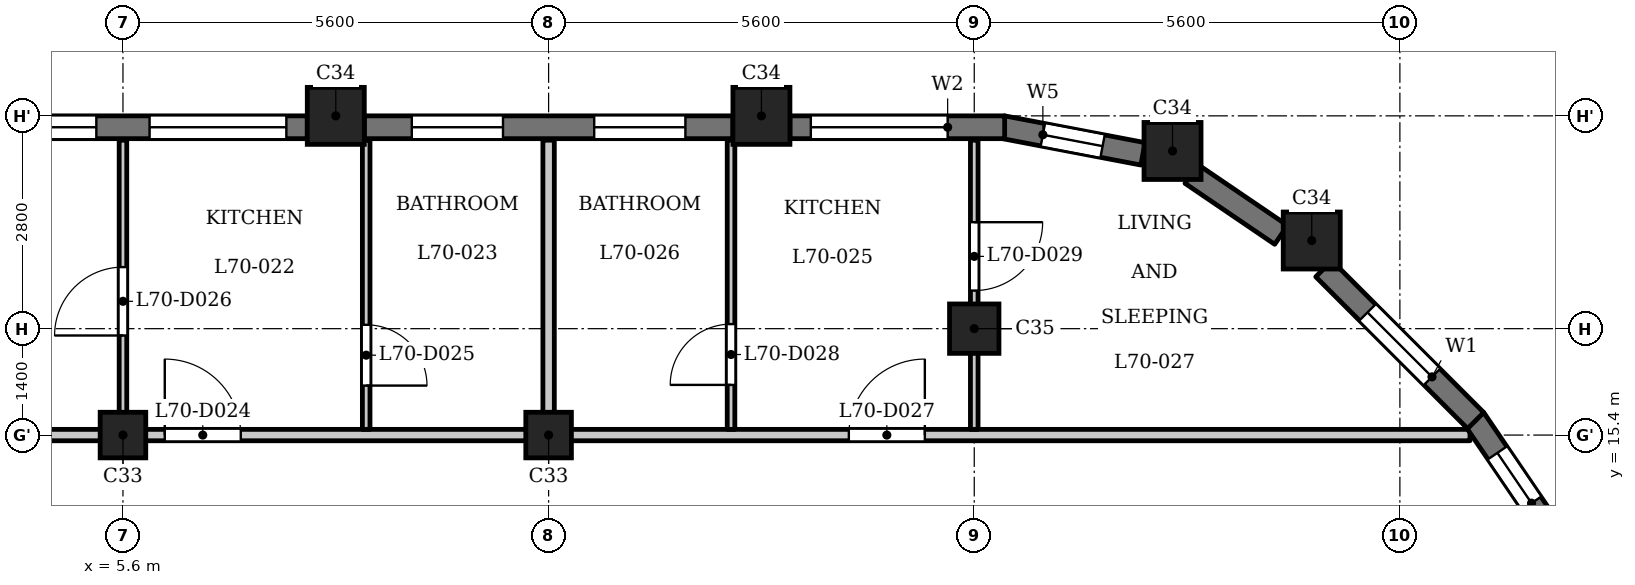
"""IFC4 building model, lengths in metres.
Left out: names, types, materials, properties, quantities, classifications, styles, units other than length and angle.
Written with IfcOpenShell. Run it as: python <this file> out.ifc"""

import sys

from ifc_helpers import new_model, si_unit, direction, frame, frame_2d, origin, origin_2d, place, context, subcontext, project, spatial, rectangle, extrude, element, fill, save


model = new_model("IFC4")
c1 = context("Model", 3, precision=1e-05, world=origin(), true_north=direction((0.0, 1.0)))
c2 = subcontext(c1, "Body", "Model", "MODEL_VIEW")
j1 = project(units=[si_unit("LENGTHUNIT", "METRE"), si_unit("PLANEANGLEUNIT", "RADIAN")], contexts=[c1])
p1 = place(None, origin())
s1 = spatial("IfcSite", under=j1, at=p1, CompositionType="ELEMENT")
p2 = place(p1, origin())
s2 = spatial("IfcBuilding", under=s1, at=p2, CompositionType="ELEMENT")
p3 = place(p2, frame((0.0, 0.0, 269.7)))
s3 = spatial("IfcBuildingStorey", under=s2, at=p3, CompositionType="ELEMENT", Elevation=269.7)
for number, where, z_axis, x_axis in (
    (1, (21.24, 17.96, 0.0), (0.0, 0.0, 1.0), (1.0, 0.0, 0.0)),
    (2, (19.409, 19.138, 0.0), (0.0, 0.0, 1.0), (1.0, 0.0, 0.0)),
    (3, (14.0, 19.6, 0.0), (0.0, 0.0, 1.0), (1.0, 0.0, 0.0)),
    (4, (8.4, 19.6, 0.0), (0.0, 0.0, 1.0), (1.0, 0.0, 0.0)),
):
    element("IfcColumn", number, at=place(p3, frame(where, z_axis=z_axis, x_axis=x_axis)), inside=s3, PredefinedType="COLUMN", context=c2, shape_type="SweptSolid", body=[
        extrude(rectangle(XDim=0.75, YDim=0.75, at=origin_2d()), origin(), (0.0, 0.0, 1.0), 3.5),
    ])
p4 = place(p3, frame((16.8, 16.8, 0.0), z_axis=(0.0, 0.0, 1.0), x_axis=(1.0, 0.0, 0.0)))
e5 = element("IfcColumn", 5, at=p4, inside=s3, PredefinedType="COLUMN", context=c2, shape_type="SweptSolid", body=[
    extrude(rectangle(XDim=0.65, YDim=0.65, at=origin_2d()), origin(), (0.0, 0.0, 1.0), 3.5),
])
for number, where, z_axis, x_axis in (
    (6, (5.6, 15.4, 0.0), (0.0, 0.0, 1.0), (1.0, 0.0, 0.0)),
    (7, (11.2, 15.4, 0.0), (0.0, 0.0, 1.0), (1.0, 0.0, 0.0)),
):
    element("IfcColumn", number, at=place(p3, frame(where, z_axis=z_axis, x_axis=x_axis)), inside=s3, PredefinedType="COLUMN", context=c2, shape_type="SweptSolid", body=[
        extrude(rectangle(XDim=0.6, YDim=0.6, at=origin_2d()), origin(), (0.0, 0.0, 1.0), 3.5),
    ])
p5 = place(p3, frame((24.436, 14.057, 0.0), z_axis=(0.0, 0.0, 1.0), x_axis=(-0.562075713892, 0.827085782645, 0.0)))
e8 = element("IfcWall", 8, at=p5, inside=s3, PredefinedType="SOLIDWALL", context=c2, shape_type="SweptSolid", body=[
    extrude(rectangle(XDim=1.881, YDim=0.3, at=frame_2d((0.94, 0.0))), origin(), (0.0, 0.0, 1.0), 2.55),
])
p6 = place(p5, frame((0.541, 0.0, 0.6)))
e9 = element("IfcOpeningElement", 9, at=p6, cuts=e8, PredefinedType="OPENING", context=c2, shape_type="SweptSolid", body=[
    extrude(rectangle(XDim=0.8, YDim=1.55, at=frame_2d((0.4, 0.775))), frame((0.0, 0.16, 0.0), z_axis=(0.0, -1.0, 0.0), x_axis=(1.0, 0.0, 0.0)), (0.0, 0.0, 1.0), 0.32),
])
p7 = place(p3, frame((23.397, 15.591, 0.0), z_axis=(0.0, 0.0, 1.0), x_axis=(-0.707106781187, 0.707106781187, 0.0)))
e10 = element("IfcWall", 10, at=p7, inside=s3, PredefinedType="SOLIDWALL", context=c2, shape_type="SweptSolid", body=[
    extrude(rectangle(XDim=2.825, YDim=0.3, at=frame_2d((1.413, 0.0))), origin(), (0.0, 0.0, 1.0), 2.55),
])
p8 = place(p7, frame((0.812, 0.0, 0.6)))
e11 = element("IfcOpeningElement", 11, at=p8, cuts=e10, PredefinedType="OPENING", context=c2, shape_type="SweptSolid", body=[
    extrude(rectangle(XDim=1.2, YDim=1.55, at=frame_2d((0.6, 0.775))), frame((0.0, 0.16, 0.0), z_axis=(0.0, -1.0, 0.0), x_axis=(1.0, 0.0, 0.0)), (0.0, 0.0, 1.0), 0.32),
])
p9 = place(p3, frame((20.837, 18.034, 0.0), z_axis=(0.0, 0.0, 1.0), x_axis=(-0.827095130818, 0.562061957952, 0.0)))
e12 = element("IfcWall", 12, at=p9, inside=s3, PredefinedType="SOLIDWALL", context=c2, shape_type="SweptSolid", body=[
    extrude(rectangle(XDim=1.427, YDim=0.3, at=frame_2d((0.713, 0.0))), origin(), (0.0, 0.0, 1.0), 2.55),
])
p10 = place(p3, frame((19.02, 19.1, 0.0), z_axis=(0.0, 0.0, 1.0), x_axis=(-0.982284001233, 0.187398348234, 0.0)))
e13 = element("IfcWall", 13, at=p10, inside=s3, PredefinedType="SOLIDWALL", context=c2, shape_type="SweptSolid", body=[
    extrude(rectangle(XDim=1.881, YDim=0.3, at=frame_2d((0.941, 0.0))), origin(), (0.0, 0.0, 1.0), 2.55),
])
p11 = place(p10, frame((0.541, 0.0, 0.6)))
e14 = element("IfcOpeningElement", 14, at=p11, cuts=e13, PredefinedType="OPENING", context=c2, shape_type="SweptSolid", body=[
    extrude(rectangle(XDim=0.8, YDim=1.55, at=frame_2d((0.4, 0.775))), frame((0.0, 0.16, 0.0), z_axis=(0.0, -1.0, 0.0), x_axis=(1.0, 0.0, 0.0)), (0.0, 0.0, 1.0), 0.32),
])
p12 = place(p3, frame((17.2, 19.45, 0.0), z_axis=(0.0, 0.0, 1.0), x_axis=(-1.0, 0.0, 0.0)))
e15 = element("IfcWall", 15, at=p12, inside=s3, PredefinedType="SOLIDWALL", context=c2, shape_type="SweptSolid", body=[
    extrude(rectangle(XDim=2.825, YDim=0.3, at=frame_2d((1.413, 0.0))), origin(), (0.0, 0.0, 1.0), 2.55),
])
p13 = place(p12, frame((0.75, 0.0, 0.9)))
e16 = element("IfcOpeningElement", 16, at=p13, cuts=e15, PredefinedType="OPENING", context=c2, shape_type="SweptSolid", body=[
    extrude(rectangle(XDim=1.8, YDim=1.25, at=frame_2d((0.9, 0.625))), frame((0.0, 0.16, 0.0), z_axis=(0.0, -1.0, 0.0), x_axis=(1.0, 0.0, 0.0)), (0.0, 0.0, 1.0), 0.32),
])
p14 = place(p3, frame((13.625, 19.45, 0.0), z_axis=(0.0, 0.0, 1.0), x_axis=(-1.0, 0.0, 0.0)))
e17 = element("IfcWall", 17, at=p14, inside=s3, PredefinedType="SOLIDWALL", context=c2, shape_type="SweptSolid", body=[
    extrude(rectangle(XDim=4.85, YDim=0.3, at=frame_2d((2.425, 0.0))), origin(), (0.0, 0.0, 1.0), 2.55),
])
p15 = place(p14, frame((0.625, 0.0, 0.6)))
e18 = element("IfcOpeningElement", 18, at=p15, cuts=e17, PredefinedType="OPENING", context=c2, shape_type="SweptSolid", body=[
    extrude(rectangle(XDim=1.2, YDim=1.55, at=frame_2d((0.6, 0.775))), frame((0.0, 0.16, 0.0), z_axis=(0.0, -1.0, 0.0), x_axis=(1.0, 0.0, 0.0)), (0.0, 0.0, 1.0), 0.32),
])
p16 = place(p14, frame((3.025, 0.0, 0.6)))
e19 = element("IfcOpeningElement", 19, at=p16, cuts=e17, PredefinedType="OPENING", context=c2, shape_type="SweptSolid", body=[
    extrude(rectangle(XDim=1.2, YDim=1.55, at=frame_2d((0.6, 0.775))), frame((0.0, 0.16, 0.0), z_axis=(0.0, -1.0, 0.0), x_axis=(1.0, 0.0, 0.0)), (0.0, 0.0, 1.0), 0.32),
])
p17 = place(p3, frame((8.025, 19.45, 0.0), z_axis=(0.0, 0.0, 1.0), x_axis=(-1.0, 0.0, 0.0)))
e20 = element("IfcWall", 20, at=p17, inside=s3, PredefinedType="SOLIDWALL", context=c2, shape_type="SweptSolid", body=[
    extrude(rectangle(XDim=4.85, YDim=0.3, at=frame_2d((2.425, 0.0))), origin(), (0.0, 0.0, 1.0), 2.55),
])
p18 = place(p17, frame((0.275, 0.0, 0.9)))
e21 = element("IfcOpeningElement", 21, at=p18, cuts=e20, PredefinedType="OPENING", context=c2, shape_type="SweptSolid", body=[
    extrude(rectangle(XDim=1.8, YDim=1.25, at=frame_2d((0.9, 0.625))), frame((0.0, 0.16, 0.0), z_axis=(0.0, -1.0, 0.0), x_axis=(1.0, 0.0, 0.0)), (0.0, 0.0, 1.0), 0.32),
])
p19 = place(p17, frame((2.775, 0.0, 0.9)))
e22 = element("IfcOpeningElement", 22, at=p19, cuts=e20, PredefinedType="OPENING", context=c2, shape_type="SweptSolid", body=[
    extrude(rectangle(XDim=1.8, YDim=1.25, at=frame_2d((0.9, 0.625))), frame((0.0, 0.16, 0.0), z_axis=(0.0, -1.0, 0.0), x_axis=(1.0, 0.0, 0.0)), (0.0, 0.0, 1.0), 0.32),
])
p20 = place(p3, frame((-23.55, 15.4, 0.0), z_axis=(0.0, 0.0, 1.0), x_axis=(1.0, 0.0, 0.0)))
e23 = element("IfcWall", 23, at=p20, inside=s3, PredefinedType="PARTITIONING", context=c2, shape_type="SweptSolid", body=[
    extrude(rectangle(XDim=46.872, YDim=0.15, at=frame_2d((23.436, 0.0))), origin(), (0.0, 0.0, 1.0), 3.2),
])
p21 = place(p20, frame((7.3, 0.0, 0.0)))
e24 = element("IfcOpeningElement", 24, at=p21, cuts=e23, PredefinedType="OPENING", context=c2, shape_type="SweptSolid", body=[
    extrude(rectangle(XDim=1.0, YDim=2.1, at=frame_2d((0.5, 1.05))), frame((0.0, 0.085, 0.0), z_axis=(0.0, -1.0, 0.0), x_axis=(1.0, 0.0, 0.0)), (0.0, 0.0, 1.0), 0.17),
])
p22 = place(p20, frame((16.3, 0.0, 0.0)))
e25 = element("IfcOpeningElement", 25, at=p22, cuts=e23, PredefinedType="OPENING", context=c2, shape_type="SweptSolid", body=[
    extrude(rectangle(XDim=1.0, YDim=2.1, at=frame_2d((0.5, 1.05))), frame((0.0, 0.085, 0.0), z_axis=(0.0, -1.0, 0.0), x_axis=(1.0, 0.0, 0.0)), (0.0, 0.0, 1.0), 0.17),
])
p23 = place(p20, frame((29.7, 0.0, 0.0)))
e26 = element("IfcOpeningElement", 26, at=p23, cuts=e23, PredefinedType="OPENING", context=c2, shape_type="SweptSolid", body=[
    extrude(rectangle(XDim=1.0, YDim=2.1, at=frame_2d((0.5, 1.05))), frame((0.0, 0.085, 0.0), z_axis=(0.0, -1.0, 0.0), x_axis=(1.0, 0.0, 0.0)), (0.0, 0.0, 1.0), 0.17),
])
p24 = place(p20, frame((38.7, 0.0, 0.0)))
e27 = element("IfcOpeningElement", 27, at=p24, cuts=e23, PredefinedType="OPENING", context=c2, shape_type="SweptSolid", body=[
    extrude(rectangle(XDim=1.0, YDim=2.1, at=frame_2d((0.5, 1.05))), frame((0.0, 0.085, 0.0), z_axis=(0.0, -1.0, 0.0), x_axis=(1.0, 0.0, 0.0)), (0.0, 0.0, 1.0), 0.17),
])
p25 = place(p3, frame((5.6, 15.475, 0.0), z_axis=(0.0, 0.0, 1.0), x_axis=(0.0, 1.0, 0.0)))
e28 = element("IfcWall", 28, at=p25, inside=s3, PredefinedType="PARTITIONING", context=c2, shape_type="SweptSolid", body=[
    extrude(rectangle(XDim=3.805, YDim=0.1, at=frame_2d((1.902, 0.0))), origin(), (0.0, 0.0, 1.0), 3.2),
])
p26 = place(p25, frame((1.235, 0.0, 0.0)))
e29 = element("IfcOpeningElement", 29, at=p26, cuts=e28, PredefinedType="OPENING", context=c2, shape_type="SweptSolid", body=[
    extrude(rectangle(XDim=0.9, YDim=2.1, at=frame_2d((0.45, 1.05))), frame((0.0, 0.06, 0.0), z_axis=(0.0, -1.0, 0.0), x_axis=(1.0, 0.0, 0.0)), (0.0, 0.0, 1.0), 0.12),
])
p27 = place(p3, frame((8.8, 15.475, 0.0), z_axis=(0.0, 0.0, 1.0), x_axis=(0.0, 1.0, 0.0)))
e30 = element("IfcWall", 30, at=p27, inside=s3, PredefinedType="PARTITIONING", context=c2, shape_type="SweptSolid", body=[
    extrude(rectangle(XDim=3.805, YDim=0.1, at=frame_2d((1.902, 0.0))), origin(), (0.0, 0.0, 1.0), 3.2),
])
p28 = place(p27, frame((0.576, 0.0, 0.0)))
e31 = element("IfcOpeningElement", 31, at=p28, cuts=e30, PredefinedType="OPENING", context=c2, shape_type="SweptSolid", body=[
    extrude(rectangle(XDim=0.8, YDim=2.1, at=frame_2d((0.4, 1.05))), frame((0.0, 0.06, 0.0), z_axis=(0.0, -1.0, 0.0), x_axis=(1.0, 0.0, 0.0)), (0.0, 0.0, 1.0), 0.12),
])
p29 = place(p3, frame((11.2, 15.475, 0.0), z_axis=(0.0, 0.0, 1.0), x_axis=(0.0, 1.0, 0.0)))
e32 = element("IfcWall", 32, at=p29, inside=s3, PredefinedType="PARTITIONING", context=c2, shape_type="SweptSolid", body=[
    extrude(rectangle(XDim=3.805, YDim=0.15, at=frame_2d((1.902, 0.0))), origin(), (0.0, 0.0, 1.0), 3.2),
])
p30 = place(p3, frame((13.6, 15.475, 0.0), z_axis=(0.0, 0.0, 1.0), x_axis=(0.0, 1.0, 0.0)))
e33 = element("IfcWall", 33, at=p30, inside=s3, PredefinedType="PARTITIONING", context=c2, shape_type="SweptSolid", body=[
    extrude(rectangle(XDim=3.805, YDim=0.1, at=frame_2d((1.902, 0.0))), origin(), (0.0, 0.0, 1.0), 3.2),
])
p31 = place(p30, frame((0.585, 0.0, 0.0)))
e34 = element("IfcOpeningElement", 34, at=p31, cuts=e33, PredefinedType="OPENING", context=c2, shape_type="SweptSolid", body=[
    extrude(rectangle(XDim=0.8, YDim=2.1, at=frame_2d((0.4, 1.05))), frame((0.0, 0.06, 0.0), z_axis=(0.0, -1.0, 0.0), x_axis=(1.0, 0.0, 0.0)), (0.0, 0.0, 1.0), 0.12),
])
p32 = place(p3, frame((16.8, 15.475, 0.0), z_axis=(0.0, 0.0, 1.0), x_axis=(0.0, 1.0, 0.0)))
e35 = element("IfcWall", 35, at=p32, inside=s3, PredefinedType="PARTITIONING", context=c2, shape_type="SweptSolid", body=[
    extrude(rectangle(XDim=3.805, YDim=0.1, at=frame_2d((1.902, 0.0))), origin(), (0.0, 0.0, 1.0), 3.2),
])
p33 = place(p32, frame((1.826, 0.0, 0.0)))
e36 = element("IfcOpeningElement", 36, at=p33, cuts=e35, PredefinedType="OPENING", context=c2, shape_type="SweptSolid", body=[
    extrude(rectangle(XDim=0.9, YDim=2.1, at=frame_2d((0.45, 1.05))), frame((0.0, 0.06, 0.0), z_axis=(0.0, -1.0, 0.0), x_axis=(1.0, 0.0, 0.0)), (0.0, 0.0, 1.0), 0.12),
])
p34 = place(p23, origin())
e37 = element("IfcDoor", 37, at=p34, inside=s3, OperationType="SINGLE_SWING_RIGHT", PredefinedType="DOOR", context=c2, shape_type="SweptSolid", body=[
    extrude(rectangle(XDim=1.0, YDim=2.1, at=frame_2d((0.5, 1.05))), frame((0.0, 0.025, 0.0), z_axis=(0.0, -1.0, 0.0), x_axis=(1.0, 0.0, 0.0)), (0.0, 0.0, 1.0), 0.05),
])
fill(e26, e37)
p35 = place(p28, origin())
e38 = element("IfcDoor", 38, at=p35, inside=s3, OperationType="SINGLE_SWING_LEFT", PredefinedType="DOOR", context=c2, shape_type="SweptSolid", body=[
    extrude(rectangle(XDim=0.8, YDim=2.1, at=frame_2d((0.4, 1.05))), frame((0.0, 0.025, 0.0), z_axis=(0.0, -1.0, 0.0), x_axis=(1.0, 0.0, 0.0)), (0.0, 0.0, 1.0), 0.05),
])
fill(e31, e38)
p36 = place(p26, origin())
e39 = element("IfcDoor", 39, at=p36, inside=s3, OperationType="SINGLE_SWING_RIGHT", PredefinedType="DOOR", context=c2, shape_type="SweptSolid", body=[
    extrude(rectangle(XDim=0.9, YDim=2.1, at=frame_2d((0.45, 1.05))), frame((0.0, 0.025, 0.0), z_axis=(0.0, -1.0, 0.0), x_axis=(1.0, 0.0, 0.0)), (0.0, 0.0, 1.0), 0.05),
])
fill(e29, e39)
p37 = place(p24, origin())
e40 = element("IfcDoor", 40, at=p37, inside=s3, OperationType="SINGLE_SWING_LEFT", PredefinedType="DOOR", context=c2, shape_type="SweptSolid", body=[
    extrude(rectangle(XDim=1.0, YDim=2.1, at=frame_2d((0.5, 1.05))), frame((0.0, 0.025, 0.0), z_axis=(0.0, -1.0, 0.0), x_axis=(1.0, 0.0, 0.0)), (0.0, 0.0, 1.0), 0.05),
])
fill(e27, e40)
p38 = place(p31, origin())
e41 = element("IfcDoor", 41, at=p38, inside=s3, OperationType="SINGLE_SWING_RIGHT", PredefinedType="DOOR", context=c2, shape_type="SweptSolid", body=[
    extrude(rectangle(XDim=0.8, YDim=2.1, at=frame_2d((0.4, 1.05))), frame((0.0, 0.025, 0.0), z_axis=(0.0, -1.0, 0.0), x_axis=(1.0, 0.0, 0.0)), (0.0, 0.0, 1.0), 0.05),
])
fill(e34, e41)
p39 = place(p33, origin())
e42 = element("IfcDoor", 42, at=p39, inside=s3, OperationType="SINGLE_SWING_RIGHT", PredefinedType="DOOR", context=c2, shape_type="SweptSolid", body=[
    extrude(rectangle(XDim=0.9, YDim=2.1, at=frame_2d((0.45, 1.05))), frame((0.0, 0.025, 0.0), z_axis=(0.0, -1.0, 0.0), x_axis=(1.0, 0.0, 0.0)), (0.0, 0.0, 1.0), 0.05),
])
fill(e36, e42)
p40 = place(p6, origin())
e43 = element("IfcWindow", 43, at=p40, inside=s3, PartitioningType="SINGLE_PANEL", PredefinedType="WINDOW", context=c2, shape_type="SweptSolid", body=[
    extrude(rectangle(XDim=0.8, YDim=1.55, at=frame_2d((0.4, 0.775))), frame((0.0, 0.03, 0.0), z_axis=(0.0, -1.0, 0.0), x_axis=(1.0, 0.0, 0.0)), (0.0, 0.0, 1.0), 0.06),
])
fill(e9, e43)
p41 = place(p8, origin())
e44 = element("IfcWindow", 44, at=p41, inside=s3, PartitioningType="SINGLE_PANEL", PredefinedType="WINDOW", context=c2, shape_type="SweptSolid", body=[
    extrude(rectangle(XDim=1.2, YDim=1.55, at=frame_2d((0.6, 0.775))), frame((0.0, 0.03, 0.0), z_axis=(0.0, -1.0, 0.0), x_axis=(1.0, 0.0, 0.0)), (0.0, 0.0, 1.0), 0.06),
])
fill(e11, e44)
p42 = place(p11, origin())
e45 = element("IfcWindow", 45, at=p42, inside=s3, PartitioningType="SINGLE_PANEL", PredefinedType="WINDOW", context=c2, shape_type="SweptSolid", body=[
    extrude(rectangle(XDim=0.8, YDim=1.55, at=frame_2d((0.4, 0.775))), frame((0.0, 0.03, 0.0), z_axis=(0.0, -1.0, 0.0), x_axis=(1.0, 0.0, 0.0)), (0.0, 0.0, 1.0), 0.06),
])
fill(e14, e45)
p43 = place(p13, origin())
e46 = element("IfcWindow", 46, at=p43, inside=s3, PartitioningType="SINGLE_PANEL", PredefinedType="WINDOW", context=c2, shape_type="SweptSolid", body=[
    extrude(rectangle(XDim=1.8, YDim=1.25, at=frame_2d((0.9, 0.625))), frame((0.0, 0.03, 0.0), z_axis=(0.0, -1.0, 0.0), x_axis=(1.0, 0.0, 0.0)), (0.0, 0.0, 1.0), 0.06),
])
fill(e16, e46)
p44 = place(p15, origin())
e47 = element("IfcWindow", 47, at=p44, inside=s3, PartitioningType="SINGLE_PANEL", PredefinedType="WINDOW", context=c2, shape_type="SweptSolid", body=[
    extrude(rectangle(XDim=1.2, YDim=1.55, at=frame_2d((0.6, 0.775))), frame((0.0, 0.03, 0.0), z_axis=(0.0, -1.0, 0.0), x_axis=(1.0, 0.0, 0.0)), (0.0, 0.0, 1.0), 0.06),
])
fill(e18, e47)
p45 = place(p16, origin())
e48 = element("IfcWindow", 48, at=p45, inside=s3, PartitioningType="SINGLE_PANEL", PredefinedType="WINDOW", context=c2, shape_type="SweptSolid", body=[
    extrude(rectangle(XDim=1.2, YDim=1.55, at=frame_2d((0.6, 0.775))), frame((0.0, 0.03, 0.0), z_axis=(0.0, -1.0, 0.0), x_axis=(1.0, 0.0, 0.0)), (0.0, 0.0, 1.0), 0.06),
])
fill(e19, e48)
p46 = place(p18, origin())
e49 = element("IfcWindow", 49, at=p46, inside=s3, PartitioningType="SINGLE_PANEL", PredefinedType="WINDOW", context=c2, shape_type="SweptSolid", body=[
    extrude(rectangle(XDim=1.8, YDim=1.25, at=frame_2d((0.9, 0.625))), frame((0.0, 0.03, 0.0), z_axis=(0.0, -1.0, 0.0), x_axis=(1.0, 0.0, 0.0)), (0.0, 0.0, 1.0), 0.06),
])
fill(e21, e49)
p47 = place(p19, origin())
e50 = element("IfcWindow", 50, at=p47, inside=s3, PartitioningType="SINGLE_PANEL", PredefinedType="WINDOW", context=c2, shape_type="SweptSolid", body=[
    extrude(rectangle(XDim=1.8, YDim=1.25, at=frame_2d((0.9, 0.625))), frame((0.0, 0.03, 0.0), z_axis=(0.0, -1.0, 0.0), x_axis=(1.0, 0.0, 0.0)), (0.0, 0.0, 1.0), 0.06),
])
fill(e22, e50)
save(model, sys.argv[1])
